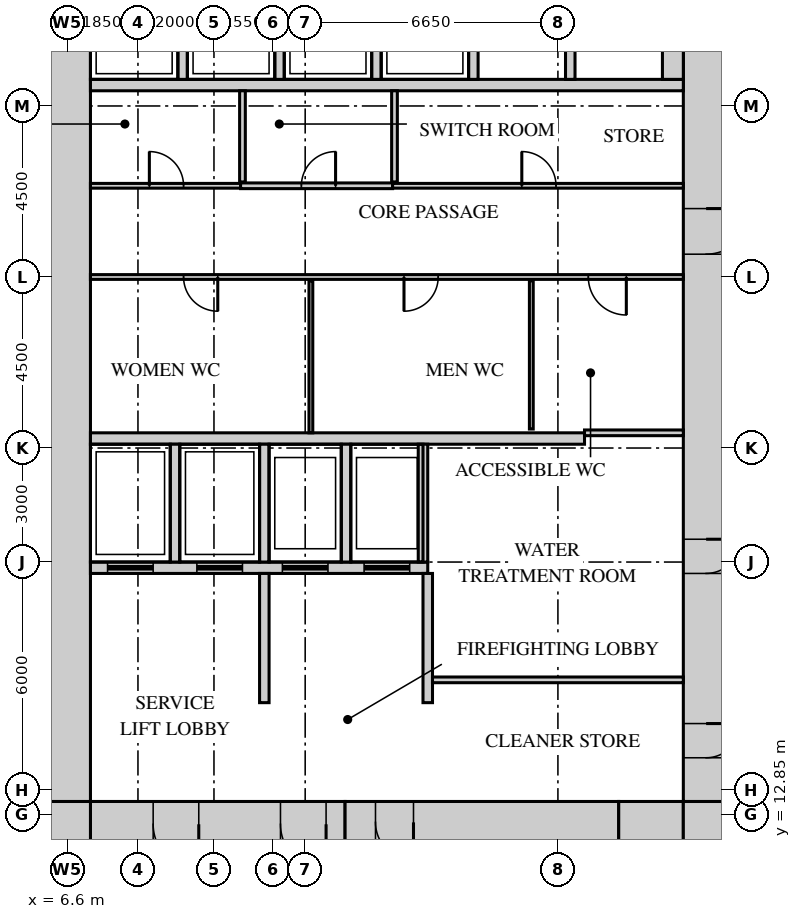
"""IFC4 building model, lengths in metres.
Left out: names, types, materials, properties, quantities, classifications, styles, units other than length and angle.
Written with IfcOpenShell. Run it as: python <this file> out.ifc"""

import sys

from ifc_helpers import new_model, si_unit, direction, frame, frame_2d, origin, place, context, subcontext, project, spatial, rectangle, extrude, source, transform, mapped, element, fill, save


model = new_model("IFC4")
c1 = context("Model", 3, precision=1e-05, world=origin(), true_north=direction((0.0, 1.0)))
c2 = subcontext(c1, "Body", "Model", "MODEL_VIEW")
j1 = project(units=[si_unit("LENGTHUNIT", "METRE"), si_unit("PLANEANGLEUNIT", "RADIAN")], contexts=[c1])
p1 = place(None, origin())
s1 = spatial("IfcSite", under=j1, at=p1, CompositionType="ELEMENT")
p2 = place(p1, origin())
s2 = spatial("IfcBuilding", under=s1, at=p2, CompositionType="ELEMENT")
p3 = place(p2, frame((0.0, 0.0, 18.5)))
s3 = spatial("IfcBuildingStorey", under=s2, at=p3, CompositionType="ELEMENT", Elevation=18.5)
m1 = source(origin(), c2, "Body", "SweptSolid", [
    extrude(rectangle(XDim=6.7, YDim=1.2, at=frame_2d((3.35, 0.0))), origin(), (0.0, 0.0, 1.0), 4.7),
])
p4 = place(p3, frame((7.2, 12.6, 0.0), z_axis=(0.0, 0.0, 1.0), x_axis=(1.0, 0.0, 0.0)))
e1 = element("IfcWall", 1, at=p4, inside=s3, PredefinedType="SHEAR", context=c2, shape_type="MappedRepresentation", body=[
    mapped(m1, transform((0.0, 0.0, 0.0))),
])
m2 = source(origin(), c2, "Body", "SweptSolid", [
    extrude(rectangle(XDim=1.2, YDim=2.1, at=frame_2d((0.6, 1.05))), frame((0.0, 0.61, 0.0), z_axis=(0.0, -1.0, 0.0), x_axis=(1.0, 0.0, 0.0)), (0.0, 0.0, 1.0), 1.22),
])
p5 = place(p4, frame((5.0, 0.0, 0.0)))
e2 = element("IfcOpeningElement", 2, at=p5, cuts=e1, PredefinedType="OPENING", context=c2, shape_type="MappedRepresentation", body=[
    mapped(m2, transform((0.0, 0.0, 0.0))),
])
p6 = place(p4, frame((1.65, 0.0, 0.0)))
e3 = element("IfcOpeningElement", 3, at=p6, cuts=e1, PredefinedType="OPENING", context=c2, shape_type="MappedRepresentation", body=[
    mapped(m2, transform((0.0, 0.0, 0.0))),
])
m3 = source(origin(), c2, "Body", "SweptSolid", [
    extrude(rectangle(XDim=7.2, YDim=1.1, at=frame_2d((3.6, 0.0))), origin(), (0.0, 0.0, 1.0), 4.7),
])
p7 = place(p3, frame((13.9, 12.65, 0.0), z_axis=(0.0, 0.0, 1.0), x_axis=(1.0, 0.0, 0.0)))
e4 = element("IfcWall", 4, at=p7, inside=s3, PredefinedType="SHEAR", context=c2, shape_type="MappedRepresentation", body=[
    mapped(m3, transform((0.0, 0.0, 0.0))),
])
m4 = source(origin(), c2, "Body", "SweptSolid", [
    extrude(rectangle(XDim=1.0, YDim=2.1, at=frame_2d((0.5, 1.05))), frame((0.0, 0.56, 0.0), z_axis=(0.0, -1.0, 0.0), x_axis=(1.0, 0.0, 0.0)), (0.0, 0.0, 1.0), 1.12),
])
p8 = place(p7, frame((0.8, 0.0, 0.0)))
e5 = element("IfcOpeningElement", 5, at=p8, cuts=e4, PredefinedType="OPENING", context=c2, shape_type="MappedRepresentation", body=[
    mapped(m4, transform((0.0, 0.0, 0.0))),
])
m5 = source(origin(), c2, "Body", "SweptSolid", [
    extrude(rectangle(XDim=1.7, YDim=1.2, at=frame_2d((0.85, 0.0))), origin(), (0.0, 0.0, 1.0), 4.7),
])
p9 = place(p3, frame((21.1, 12.6, 0.0), z_axis=(0.0, 0.0, 1.0), x_axis=(1.0, 0.0, 0.0)))
e6 = element("IfcWall", 6, at=p9, inside=s3, PredefinedType="SHEAR", context=c2, shape_type="MappedRepresentation", body=[
    mapped(m5, transform((0.0, 0.0, 0.0))),
])
m6 = source(origin(), c2, "Body", "SweptSolid", [
    extrude(rectangle(XDim=1.2, YDim=1.2, at=frame_2d((0.6, 0.0))), origin(), (0.0, 0.0, 1.0), 4.7),
])
for number, where, z_axis, x_axis in (
    (7, (22.8, 12.6, 0.0), (0.0, 0.0, 1.0), (1.0, 0.0, 0.0)),
    (8, (6.0, 12.6, 0.0), (0.0, 0.0, 1.0), (1.0, 0.0, 0.0)),
):
    element("IfcWall", number, at=place(p3, frame(where, z_axis=z_axis, x_axis=x_axis)), inside=s3, PredefinedType="SHEAR", context=c2, shape_type="MappedRepresentation", body=[
        mapped(m6, transform((0.0, 0.0, 0.0))),
    ])
m7 = source(origin(), c2, "Body", "SweptSolid", [
    extrude(rectangle(XDim=27.6, YDim=1.2, at=frame_2d((13.8, 0.0))), origin(), (0.0, 0.0, 1.0), 4.7),
])
p10 = place(p3, frame((23.4, 13.2, 0.0), z_axis=(0.0, 0.0, 1.0), x_axis=(0.0, 1.0, 0.0)))
e9 = element("IfcWall", 9, at=p10, inside=s3, PredefinedType="SHEAR", context=c2, shape_type="MappedRepresentation", body=[
    mapped(m7, transform((0.0, 0.0, 0.0))),
])
m8 = source(origin(), c2, "Body", "SweptSolid", [
    extrude(rectangle(XDim=1.8, YDim=2.1, at=frame_2d((0.9, 1.05))), frame((0.0, 0.61, 0.0), z_axis=(0.0, -1.0, 0.0), x_axis=(1.0, 0.0, 0.0)), (0.0, 0.0, 1.0), 1.22),
])
p11 = place(p10, frame((22.4, 0.0, 0.0)))
e10 = element("IfcOpeningElement", 10, at=p11, cuts=e9, PredefinedType="OPENING", context=c2, shape_type="MappedRepresentation", body=[
    mapped(m8, transform((0.0, 0.0, 0.0))),
])
p12 = place(p10, frame((14.4, 0.0, 0.0)))
e11 = element("IfcOpeningElement", 11, at=p12, cuts=e9, PredefinedType="OPENING", context=c2, shape_type="MappedRepresentation", body=[
    mapped(m2, transform((0.0, 0.0, 0.0))),
])
m9 = source(origin(), c2, "Body", "SweptSolid", [
    extrude(rectangle(XDim=0.9, YDim=2.1, at=frame_2d((0.45, 1.05))), frame((0.0, 0.61, 0.0), z_axis=(0.0, -1.0, 0.0), x_axis=(1.0, 0.0, 0.0)), (0.0, 0.0, 1.0), 1.22),
])
p13 = place(p10, frame((1.15, 0.0, 0.0)))
e12 = element("IfcOpeningElement", 12, at=p13, cuts=e9, PredefinedType="OPENING", context=c2, shape_type="MappedRepresentation", body=[
    mapped(m9, transform((0.0, 0.0, 0.0))),
])
p14 = place(p10, frame((6.0, 0.0, 0.0)))
e13 = element("IfcOpeningElement", 13, at=p14, cuts=e9, PredefinedType="OPENING", context=c2, shape_type="MappedRepresentation", body=[
    mapped(m9, transform((0.0, 0.0, 0.0))),
])
p15 = place(p3, frame((6.6, 13.2, 0.0), z_axis=(0.0, 0.0, 1.0), x_axis=(0.0, 1.0, 0.0)))
e14 = element("IfcWall", 14, at=p15, inside=s3, PredefinedType="SHEAR", context=c2, shape_type="MappedRepresentation", body=[
    mapped(m7, transform((0.0, 0.0, 0.0))),
])
m10 = source(origin(), c2, "Body", "SweptSolid", [
    extrude(rectangle(XDim=13.0, YDim=0.3, at=frame_2d((6.5, 0.0))), origin(), (0.0, 0.0, 1.0), 4.7),
])
p16 = place(p3, frame((7.2, 22.75, 0.0), z_axis=(0.0, 0.0, 1.0), x_axis=(1.0, 0.0, 0.0)))
e15 = element("IfcWall", 15, at=p16, inside=s3, PredefinedType="STANDARD", context=c2, shape_type="MappedRepresentation", body=[
    mapped(m10, transform((0.0, 0.0, 0.0))),
])
m11 = source(origin(), c2, "Body", "SweptSolid", [
    extrude(rectangle(XDim=8.875, YDim=0.3, at=frame_2d((4.438, 0.0))), origin(), (0.0, 0.0, 1.0), 4.7),
])
p17 = place(p3, frame((7.2, 19.35, 0.0), z_axis=(0.0, 0.0, 1.0), x_axis=(1.0, 0.0, 0.0)))
e16 = element("IfcWall", 16, at=p17, inside=s3, PredefinedType="STANDARD", context=c2, shape_type="MappedRepresentation", body=[
    mapped(m11, transform((0.0, 0.0, 0.0))),
])
m12 = source(origin(), c2, "Body", "SweptSolid", [
    extrude(rectangle(XDim=1.2, YDim=2.1, at=frame_2d((0.6, 1.05))), frame((0.0, 0.16, 0.0), z_axis=(0.0, -1.0, 0.0), x_axis=(1.0, 0.0, 0.0)), (0.0, 0.0, 1.0), 0.32),
])
p18 = place(p17, frame((0.45, 0.0, 0.0)))
e17 = element("IfcOpeningElement", 17, at=p18, cuts=e16, PredefinedType="OPENING", context=c2, shape_type="MappedRepresentation", body=[
    mapped(m12, transform((0.0, 0.0, 0.0))),
])
p19 = place(p17, frame((2.8, 0.0, 0.0)))
e18 = element("IfcOpeningElement", 18, at=p19, cuts=e16, PredefinedType="OPENING", context=c2, shape_type="MappedRepresentation", body=[
    mapped(m12, transform((0.0, 0.0, 0.0))),
])
p20 = place(p17, frame((5.05, 0.0, 0.0)))
e19 = element("IfcOpeningElement", 19, at=p20, cuts=e16, PredefinedType="OPENING", context=c2, shape_type="MappedRepresentation", body=[
    mapped(m12, transform((0.0, 0.0, 0.0))),
])
p21 = place(p17, frame((7.2, 0.0, 0.0)))
e20 = element("IfcOpeningElement", 20, at=p21, cuts=e16, PredefinedType="OPENING", context=c2, shape_type="MappedRepresentation", body=[
    mapped(m12, transform((0.0, 0.0, 0.0))),
])
m13 = source(origin(), c2, "Body", "SweptSolid", [
    extrude(rectangle(XDim=15.6, YDim=0.3, at=frame_2d((7.8, 0.0))), origin(), (0.0, 0.0, 1.0), 4.7),
])
p22 = place(p3, frame((7.2, 32.05, 0.0), z_axis=(0.0, 0.0, 1.0), x_axis=(1.0, 0.0, 0.0)))
e21 = element("IfcWall", 21, at=p22, inside=s3, PredefinedType="STANDARD", context=c2, shape_type="MappedRepresentation", body=[
    mapped(m13, transform((0.0, 0.0, 0.0))),
])
m14 = source(origin(), c2, "Body", "SweptSolid", [
    extrude(rectangle(XDim=3.1, YDim=0.25, at=frame_2d((1.55, 0.0))), origin(), (0.0, 0.0, 1.0), 4.7),
])
for number, where, z_axis, x_axis in (
    (22, (9.425, 19.5, 0.0), (0.0, 0.0, 1.0), (0.0, 1.0, 0.0)),
    (23, (11.775, 19.5, 0.0), (0.0, 0.0, 1.0), (0.0, 1.0, 0.0)),
    (24, (13.925, 19.5, 0.0), (0.0, 0.0, 1.0), (0.0, 1.0, 0.0)),
    (25, (15.95, 19.5, 0.0), (0.0, 0.0, 1.0), (0.0, 1.0, 0.0)),
):
    element("IfcWall", number, at=place(p3, frame(where, z_axis=z_axis, x_axis=x_axis)), inside=s3, PredefinedType="STANDARD", context=c2, shape_type="MappedRepresentation", body=[
        mapped(m14, transform((0.0, 0.0, 0.0))),
    ])
m15 = source(origin(), c2, "Body", "SweptSolid", [
    extrude(rectangle(XDim=2.4, YDim=0.25, at=frame_2d((1.2, 0.0))), origin(), (0.0, 0.0, 1.0), 4.7),
])
for number, where, z_axis, x_axis in (
    (26, (9.625, 32.2, 0.0), (0.0, 0.0, 1.0), (0.0, 1.0, 0.0)),
    (27, (12.175, 32.2, 0.0), (0.0, 0.0, 1.0), (0.0, 1.0, 0.0)),
    (28, (14.725, 32.2, 0.0), (0.0, 0.0, 1.0), (0.0, 1.0, 0.0)),
    (29, (17.275, 32.2, 0.0), (0.0, 0.0, 1.0), (0.0, 1.0, 0.0)),
    (30, (19.825, 32.2, 0.0), (0.0, 0.0, 1.0), (0.0, 1.0, 0.0)),
):
    element("IfcWall", number, at=place(p3, frame(where, z_axis=z_axis, x_axis=x_axis)), inside=s3, PredefinedType="STANDARD", context=c2, shape_type="MappedRepresentation", body=[
        mapped(m15, transform((0.0, 0.0, 0.0))),
    ])
m16 = source(origin(), c2, "Body", "SweptSolid", [
    extrude(rectangle(XDim=2.4, YDim=0.55, at=frame_2d((1.2, 0.0))), origin(), (0.0, 0.0, 1.0), 4.7),
])
p23 = place(p3, frame((22.525, 32.2, 0.0), z_axis=(0.0, 0.0, 1.0), x_axis=(0.0, 1.0, 0.0)))
e31 = element("IfcWall", 31, at=p23, inside=s3, PredefinedType="STANDARD", context=c2, shape_type="MappedRepresentation", body=[
    mapped(m16, transform((0.0, 0.0, 0.0))),
])
m17 = source(origin(), c2, "Body", "SweptSolid", [
    extrude(rectangle(XDim=3.4, YDim=0.25, at=frame_2d((1.7, 0.0))), origin(), (0.0, 0.0, 1.0), 4.7),
])
for number, where, z_axis, x_axis in (
    (32, (16.075, 15.8, 0.0), (0.0, 0.0, 1.0), (0.0, 1.0, 0.0)),
    (33, (11.775, 15.8, 0.0), (0.0, 0.0, 1.0), (0.0, 1.0, 0.0)),
):
    element("IfcWall", number, at=place(p3, frame(where, z_axis=z_axis, x_axis=x_axis)), inside=s3, PredefinedType="STANDARD", context=c2, shape_type="MappedRepresentation", body=[
        mapped(m17, transform((0.0, 0.0, 0.0))),
    ])
m18 = source(origin(), c2, "Body", "SweptSolid", [
    extrude(rectangle(XDim=6.6, YDim=0.15, at=frame_2d((3.3, 0.0))), origin(), (0.0, 0.0, 1.0), 4.7),
])
p24 = place(p3, frame((16.2, 16.4, 0.0), z_axis=(0.0, 0.0, 1.0), x_axis=(1.0, 0.0, 0.0)))
e34 = element("IfcWall", 34, at=p24, inside=s3, PredefinedType="PARTITIONING", context=c2, shape_type="MappedRepresentation", body=[
    mapped(m18, transform((0.0, 0.0, 0.0))),
])
m19 = source(origin(), c2, "Body", "SweptSolid", [
    extrude(rectangle(XDim=4.0, YDim=0.1, at=frame_2d((2.0, 0.0))), origin(), (0.0, 0.0, 1.0), 4.7),
])
p25 = place(p3, frame((13.0, 22.9, 0.0), z_axis=(0.0, 0.0, 1.0), x_axis=(0.0, 1.0, 0.0)))
e35 = element("IfcWall", 35, at=p25, inside=s3, PredefinedType="PARTITIONING", context=c2, shape_type="MappedRepresentation", body=[
    mapped(m19, transform((0.0, 0.0, 0.0))),
])
m20 = source(origin(), c2, "Body", "SweptSolid", [
    extrude(rectangle(XDim=2.6, YDim=0.15, at=frame_2d((1.3, 0.0))), origin(), (0.0, 0.0, 1.0), 4.7),
])
p26 = place(p3, frame((20.2, 22.9, 0.0), z_axis=(0.0, 0.0, 1.0), x_axis=(1.0, 0.0, 0.0)))
e36 = element("IfcWall", 36, at=p26, inside=s3, PredefinedType="PARTITIONING", context=c2, shape_type="MappedRepresentation", body=[
    mapped(m20, transform((0.0, 0.0, 0.0))),
])
m21 = source(origin(), c2, "Body", "SweptSolid", [
    extrude(rectangle(XDim=3.9, YDim=0.1, at=frame_2d((1.95, 0.0))), origin(), (0.0, 0.0, 1.0), 4.7),
])
p27 = place(p3, frame((18.8, 23.0, 0.0), z_axis=(0.0, 0.0, 1.0), x_axis=(0.0, 1.0, 0.0)))
e37 = element("IfcWall", 37, at=p27, inside=s3, PredefinedType="PARTITIONING", context=c2, shape_type="MappedRepresentation", body=[
    mapped(m21, transform((0.0, 0.0, 0.0))),
])
m22 = source(origin(), c2, "Body", "SweptSolid", [
    extrude(rectangle(XDim=15.6, YDim=0.125, at=frame_2d((7.8, 0.0))), origin(), (0.0, 0.0, 1.0), 4.7),
])
p28 = place(p3, frame((7.2, 27.0, 0.0), z_axis=(0.0, 0.0, 1.0), x_axis=(1.0, 0.0, 0.0)))
e38 = element("IfcWall", 38, at=p28, inside=s3, PredefinedType="PARTITIONING", context=c2, shape_type="MappedRepresentation", body=[
    mapped(m22, transform((0.0, 0.0, 0.0))),
])
m23 = source(origin(), c2, "Body", "SweptSolid", [
    extrude(rectangle(XDim=0.9, YDim=2.1, at=frame_2d((0.45, 1.05))), frame((0.0, 0.073, 0.0), z_axis=(0.0, -1.0, 0.0), x_axis=(1.0, 0.0, 0.0)), (0.0, 0.0, 1.0), 0.145),
])
p29 = place(p28, frame((2.45, 0.0, 0.0)))
e39 = element("IfcOpeningElement", 39, at=p29, cuts=e38, PredefinedType="OPENING", context=c2, shape_type="MappedRepresentation", body=[
    mapped(m23, transform((0.0, 0.0, 0.0))),
])
p30 = place(p28, frame((8.25, 0.0, 0.0)))
e40 = element("IfcOpeningElement", 40, at=p30, cuts=e38, PredefinedType="OPENING", context=c2, shape_type="MappedRepresentation", body=[
    mapped(m23, transform((0.0, 0.0, 0.0))),
])
m24 = source(origin(), c2, "Body", "SweptSolid", [
    extrude(rectangle(XDim=1.0, YDim=2.1, at=frame_2d((0.5, 1.05))), frame((0.0, 0.073, 0.0), z_axis=(0.0, -1.0, 0.0), x_axis=(1.0, 0.0, 0.0)), (0.0, 0.0, 1.0), 0.145),
])
p31 = place(p28, frame((13.1, 0.0, 0.0)))
e41 = element("IfcOpeningElement", 41, at=p31, cuts=e38, PredefinedType="OPENING", context=c2, shape_type="MappedRepresentation", body=[
    mapped(m24, transform((0.0, 0.0, 0.0))),
])
m25 = source(origin(), c2, "Body", "SweptSolid", [
    extrude(rectangle(XDim=3.95, YDim=0.125, at=frame_2d((1.975, 0.0))), origin(), (0.0, 0.0, 1.0), 4.7),
])
p32 = place(p3, frame((7.2, 29.4, 0.0), z_axis=(0.0, 0.0, 1.0), x_axis=(1.0, 0.0, 0.0)))
e42 = element("IfcWall", 42, at=p32, inside=s3, PredefinedType="PARTITIONING", context=c2, shape_type="MappedRepresentation", body=[
    mapped(m25, transform((0.0, 0.0, 0.0))),
])
p33 = place(p32, frame((1.55, 0.0, 0.0)))
e43 = element("IfcOpeningElement", 43, at=p33, cuts=e42, PredefinedType="OPENING", context=c2, shape_type="MappedRepresentation", body=[
    mapped(m23, transform((0.0, 0.0, 0.0))),
])
m26 = source(origin(), c2, "Body", "SweptSolid", [
    extrude(rectangle(XDim=4.0, YDim=0.15, at=frame_2d((2.0, 0.0))), origin(), (0.0, 0.0, 1.0), 4.7),
])
p34 = place(p3, frame((11.15, 29.4, 0.0), z_axis=(0.0, 0.0, 1.0), x_axis=(1.0, 0.0, 0.0)))
e44 = element("IfcWall", 44, at=p34, inside=s3, PredefinedType="PARTITIONING", context=c2, shape_type="MappedRepresentation", body=[
    mapped(m26, transform((0.0, 0.0, 0.0))),
])
m27 = source(origin(), c2, "Body", "SweptSolid", [
    extrude(rectangle(XDim=0.9, YDim=2.1, at=frame_2d((0.45, 1.05))), frame((0.0, 0.085, 0.0), z_axis=(0.0, -1.0, 0.0), x_axis=(1.0, 0.0, 0.0)), (0.0, 0.0, 1.0), 0.17),
])
p35 = place(p34, frame((1.6, 0.0, 0.0)))
e45 = element("IfcOpeningElement", 45, at=p35, cuts=e44, PredefinedType="OPENING", context=c2, shape_type="MappedRepresentation", body=[
    mapped(m27, transform((0.0, 0.0, 0.0))),
])
m28 = source(origin(), c2, "Body", "SweptSolid", [
    extrude(rectangle(XDim=7.65, YDim=0.125, at=frame_2d((3.825, 0.0))), origin(), (0.0, 0.0, 1.0), 4.7),
])
p36 = place(p3, frame((15.15, 29.4, 0.0), z_axis=(0.0, 0.0, 1.0), x_axis=(1.0, 0.0, 0.0)))
e46 = element("IfcWall", 46, at=p36, inside=s3, PredefinedType="PARTITIONING", context=c2, shape_type="MappedRepresentation", body=[
    mapped(m28, transform((0.0, 0.0, 0.0))),
])
p37 = place(p36, frame((3.4, 0.0, 0.0)))
e47 = element("IfcOpeningElement", 47, at=p37, cuts=e46, PredefinedType="OPENING", context=c2, shape_type="MappedRepresentation", body=[
    mapped(m23, transform((0.0, 0.0, 0.0))),
])
m29 = source(origin(), c2, "Body", "SweptSolid", [
    extrude(rectangle(XDim=2.4, YDim=0.15, at=frame_2d((1.2, 0.0))), origin(), (0.0, 0.0, 1.0), 4.7),
])
for number, where, z_axis, x_axis in (
    (48, (11.2, 29.5, 0.0), (0.0, 0.0, 1.0), (0.0, 1.0, 0.0)),
    (49, (15.2, 29.5, 0.0), (0.0, 0.0, 1.0), (0.0, 1.0, 0.0)),
):
    element("IfcWall", number, at=place(p3, frame(where, z_axis=z_axis, x_axis=x_axis)), inside=s3, PredefinedType="PARTITIONING", context=c2, shape_type="MappedRepresentation", body=[
        mapped(m29, transform((0.0, 0.0, 0.0))),
    ])
m30 = source(origin(), c2, "Body", "SweptSolid", [
    extrude(rectangle(XDim=1.2, YDim=2.1, at=frame_2d((0.6, 1.05))), frame((0.0, 0.55, 0.0), z_axis=(0.0, -1.0, 0.0), x_axis=(1.0, 0.0, 0.0)), (0.0, 0.0, 1.0), 1.1),
])
p38 = place(p12, origin())
e50 = element("IfcDoor", 50, at=p38, inside=s3, OperationType="SINGLE_SWING_RIGHT", PredefinedType="DOOR", context=c2, shape_type="MappedRepresentation", body=[
    mapped(m30, transform((0.0, 0.0, 0.0))),
])
fill(e11, e50)
m31 = source(origin(), c2, "Body", "SweptSolid", [
    extrude(rectangle(XDim=0.9, YDim=2.1, at=frame_2d((0.45, 1.05))), frame((0.0, 0.025, 0.0), z_axis=(0.0, -1.0, 0.0), x_axis=(1.0, 0.0, 0.0)), (0.0, 0.0, 1.0), 0.05),
])
p39 = place(p33, origin())
e51 = element("IfcDoor", 51, at=p39, inside=s3, OperationType="SINGLE_SWING_RIGHT", PredefinedType="DOOR", context=c2, shape_type="MappedRepresentation", body=[
    mapped(m31, transform((0.0, 0.0, 0.0))),
])
fill(e43, e51)
p40 = place(p35, origin())
e52 = element("IfcDoor", 52, at=p40, inside=s3, OperationType="SINGLE_SWING_LEFT", PredefinedType="DOOR", context=c2, shape_type="MappedRepresentation", body=[
    mapped(m31, transform((0.0, 0.0, 0.0))),
])
fill(e45, e52)
p41 = place(p37, origin())
e53 = element("IfcDoor", 53, at=p41, inside=s3, OperationType="SINGLE_SWING_RIGHT", PredefinedType="DOOR", context=c2, shape_type="MappedRepresentation", body=[
    mapped(m31, transform((0.0, 0.0, 0.0))),
])
fill(e47, e53)
p42 = place(p29, origin())
e54 = element("IfcDoor", 54, at=p42, inside=s3, OperationType="SINGLE_SWING_RIGHT", PredefinedType="DOOR", context=c2, shape_type="MappedRepresentation", body=[
    mapped(m31, transform((0.0, 0.0, 0.0))),
])
fill(e39, e54)
p43 = place(p30, origin())
e55 = element("IfcDoor", 55, at=p43, inside=s3, OperationType="SINGLE_SWING_LEFT", PredefinedType="DOOR", context=c2, shape_type="MappedRepresentation", body=[
    mapped(m31, transform((0.0, 0.0, 0.0))),
])
fill(e40, e55)
m32 = source(origin(), c2, "Body", "SweptSolid", [
    extrude(rectangle(XDim=1.0, YDim=2.1, at=frame_2d((0.5, 1.05))), frame((0.0, 0.025, 0.0), z_axis=(0.0, -1.0, 0.0), x_axis=(1.0, 0.0, 0.0)), (0.0, 0.0, 1.0), 0.05),
])
p44 = place(p31, origin())
e56 = element("IfcDoor", 56, at=p44, inside=s3, OperationType="SINGLE_SWING_RIGHT", PredefinedType="DOOR", context=c2, shape_type="MappedRepresentation", body=[
    mapped(m32, transform((0.0, 0.0, 0.0))),
])
fill(e41, e56)
m33 = source(origin(), c2, "Body", "SweptSolid", [
    extrude(rectangle(XDim=0.9, YDim=2.1, at=frame_2d((0.45, 1.05))), frame((0.0, 0.55, 0.0), z_axis=(0.0, -1.0, 0.0), x_axis=(1.0, 0.0, 0.0)), (0.0, 0.0, 1.0), 1.1),
])
p45 = place(p13, origin())
e57 = element("IfcDoor", 57, at=p45, inside=s3, OperationType="SINGLE_SWING_RIGHT", PredefinedType="DOOR", context=c2, shape_type="MappedRepresentation", body=[
    mapped(m33, transform((0.0, 0.0, 0.0))),
])
fill(e12, e57)
p46 = place(p14, origin())
e58 = element("IfcDoor", 58, at=p46, inside=s3, OperationType="SINGLE_SWING_RIGHT", PredefinedType="DOOR", context=c2, shape_type="MappedRepresentation", body=[
    mapped(m33, transform((0.0, 0.0, 0.0))),
])
fill(e13, e58)
p47 = place(p5, origin())
e59 = element("IfcDoor", 59, at=p47, inside=s3, OperationType="SINGLE_SWING_RIGHT", PredefinedType="DOOR", context=c2, shape_type="MappedRepresentation", body=[
    mapped(m30, transform((0.0, 0.0, 0.0))),
])
fill(e2, e59)
p48 = place(p6, origin())
e60 = element("IfcDoor", 60, at=p48, inside=s3, OperationType="SINGLE_SWING_RIGHT", PredefinedType="DOOR", context=c2, shape_type="MappedRepresentation", body=[
    mapped(m30, transform((0.0, 0.0, 0.0))),
])
fill(e3, e60)
m34 = source(origin(), c2, "Body", "SweptSolid", [
    extrude(rectangle(XDim=1.0, YDim=2.1, at=frame_2d((0.5, 1.05))), frame((0.0, 0.5, 0.0), z_axis=(0.0, -1.0, 0.0), x_axis=(1.0, 0.0, 0.0)), (0.0, 0.0, 1.0), 1.0),
])
p49 = place(p8, origin())
e61 = element("IfcDoor", 61, at=p49, inside=s3, OperationType="SINGLE_SWING_RIGHT", PredefinedType="DOOR", context=c2, shape_type="MappedRepresentation", body=[
    mapped(m34, transform((0.0, 0.0, 0.0))),
])
fill(e5, e61)
m35 = source(origin(), c2, "Body", "SweptSolid", [
    extrude(rectangle(XDim=1.2, YDim=2.1, at=frame_2d((0.6, 1.05))), frame((0.0, 0.025, 0.0), z_axis=(0.0, -1.0, 0.0), x_axis=(1.0, 0.0, 0.0)), (0.0, 0.0, 1.0), 0.05),
])
p50 = place(p18, origin())
e62 = element("IfcDoor", 62, at=p50, inside=s3, OperationType="DOUBLE_DOOR_SLIDING", PredefinedType="DOOR", context=c2, shape_type="MappedRepresentation", body=[
    mapped(m35, transform((0.0, 0.0, 0.0))),
])
fill(e17, e62)
p51 = place(p19, origin())
e63 = element("IfcDoor", 63, at=p51, inside=s3, OperationType="DOUBLE_DOOR_SLIDING", PredefinedType="DOOR", context=c2, shape_type="MappedRepresentation", body=[
    mapped(m35, transform((0.0, 0.0, 0.0))),
])
fill(e18, e63)
p52 = place(p20, origin())
e64 = element("IfcDoor", 64, at=p52, inside=s3, OperationType="DOUBLE_DOOR_SLIDING", PredefinedType="DOOR", context=c2, shape_type="MappedRepresentation", body=[
    mapped(m35, transform((0.0, 0.0, 0.0))),
])
fill(e19, e64)
p53 = place(p21, origin())
e65 = element("IfcDoor", 65, at=p53, inside=s3, OperationType="DOUBLE_DOOR_SLIDING", PredefinedType="DOOR", context=c2, shape_type="MappedRepresentation", body=[
    mapped(m35, transform((0.0, 0.0, 0.0))),
])
fill(e20, e65)
save(model, sys.argv[1])
